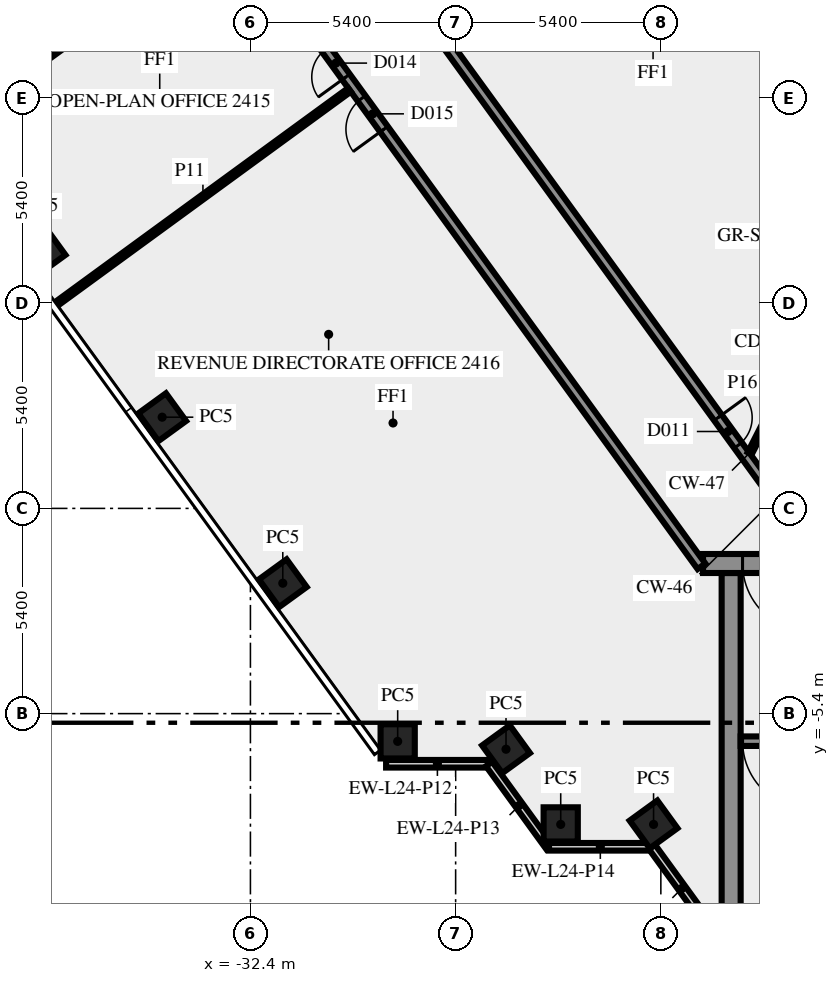
"""IFC4 building model, lengths in metres.
Left out: names, types, materials, properties, quantities, classifications, styles, units other than length and angle.
Written with IfcOpenShell. Run it as: python <this file> out.ifc"""

import sys

from ifc_helpers import new_model, si_unit, direction, frame, frame_2d, origin, origin_2d, place, context, subcontext, project, spatial, rectangle, extrude, element, fill, save


model = new_model("IFC4")
c1 = context("Model", 3, precision=1e-05, world=origin(), true_north=direction((0.0, 1.0)))
c2 = subcontext(c1, "Body", "Model", "MODEL_VIEW")
j1 = project(units=[si_unit("LENGTHUNIT", "METRE"), si_unit("PLANEANGLEUNIT", "RADIAN")], contexts=[c1])
p1 = place(None, origin())
s1 = spatial("IfcSite", under=j1, at=p1, CompositionType="ELEMENT")
p2 = place(p1, origin())
s2 = spatial("IfcBuilding", under=s1, at=p2, CompositionType="ELEMENT")
p3 = place(p2, frame((0.0, 0.0, 105.0)))
s3 = spatial("IfcBuildingStorey", under=s2, at=p3, CompositionType="ELEMENT", Elevation=105.0)
for number, where, z_axis, x_axis in (
    (1, (-37.896, 6.769, 0.0), (0.0, 0.0, 1.0), (0.588, -0.809, 0.0)),
    (2, (-34.722, 2.4, 0.0), (0.0, 0.0, 1.0), (0.588, -0.809, 0.0)),
    (3, (-31.548, -1.969, 0.0), (0.0, 0.0, 1.0), (0.588, -0.809, 0.0)),
    (4, (-28.525, -6.13, 0.0), (0.0, 0.0, 1.0), (1.0, 0.0, 0.0)),
    (5, (-25.674, -6.337, 0.0), (0.0, 0.0, 1.0), (0.588, -0.809, 0.0)),
    (6, (-24.235, -8.315, 0.0), (0.0, 0.0, 1.0), (1.0, 0.0, 0.0)),
    (7, (-21.792, -8.315, 0.0), (0.0, 0.0, 1.0), (0.588, -0.809, 0.0)),
):
    element("IfcColumn", number, at=place(p3, frame(where, z_axis=z_axis, x_axis=x_axis)), inside=s3, PredefinedType="COLUMN", context=c2, shape_type="SweptSolid", body=[
        extrude(rectangle(XDim=0.9, YDim=0.9, at=origin_2d()), origin(), (0.0, 0.0, 1.0), 3.65),
    ])
p4 = place(p3, frame((-28.83, -6.719, 0.0), z_axis=(0.0, 0.0, 1.0), x_axis=(1.0, 0.0, 0.0)))
e8 = element("IfcWall", 8, at=p4, inside=s3, PredefinedType="SOLIDWALL", context=c2, shape_type="SweptSolid", body=[
    extrude(rectangle(XDim=2.7, YDim=0.2, at=frame_2d((1.35, 0.0))), origin(), (0.0, 0.0, 1.0), 3.65),
])
p5 = place(p3, frame((-26.12, -6.724, 0.0), z_axis=(0.0, 0.0, 1.0), x_axis=(0.587720002413, -0.809064397168, 0.0)))
e9 = element("IfcWall", 9, at=p5, inside=s3, PredefinedType="SOLIDWALL", context=c2, shape_type="SweptSolid", body=[
    extrude(rectangle(XDim=2.7, YDim=0.2, at=frame_2d((1.35, 0.0))), origin(), (0.0, 0.0, 1.0), 3.65),
])
p6 = place(p3, frame((-24.543, -8.904, 0.0), z_axis=(0.0, 0.0, 1.0), x_axis=(1.0, 0.0, 0.0)))
e10 = element("IfcWall", 10, at=p6, inside=s3, PredefinedType="SOLIDWALL", context=c2, shape_type="SweptSolid", body=[
    extrude(rectangle(XDim=2.7, YDim=0.2, at=frame_2d((1.35, 0.0))), origin(), (0.0, 0.0, 1.0), 3.65),
])
p7 = place(p3, frame((-21.833, -8.909, 0.0), z_axis=(0.0, 0.0, 1.0), x_axis=(0.587766567315, -0.809030569476, 0.0)))
e11 = element("IfcWall", 11, at=p7, inside=s3, PredefinedType="SOLIDWALL", context=c2, shape_type="SweptSolid", body=[
    extrude(rectangle(XDim=2.688, YDim=0.2, at=frame_2d((1.344, 0.0))), origin(), (0.0, 0.0, 1.0), 3.65),
])
p8 = place(p3, frame((-19.75, -10.5, 0.0), z_axis=(0.0, 0.0, 1.0), x_axis=(0.0, 1.0, 0.0)))
e12 = element("IfcWall", 12, at=p8, inside=s3, PredefinedType="SHEAR", context=c2, shape_type="SweptSolid", body=[
    extrude(rectangle(XDim=8.8, YDim=0.5, at=frame_2d((4.4, 0.0))), origin(), (0.0, 0.0, 1.0), 3.65),
])
p9 = place(p3, frame((-11.45, -6.125, 0.0), z_axis=(0.0, 0.0, 1.0), x_axis=(-1.0, 0.0, 0.0)))
e13 = element("IfcWall", 13, at=p9, inside=s3, PredefinedType="SHEAR", context=c2, shape_type="SweptSolid", body=[
    extrude(rectangle(XDim=8.05, YDim=0.25, at=frame_2d((4.025, 0.0))), origin(), (0.0, 0.0, 1.0), 3.65),
])
p10 = place(p9, frame((6.2, 0.0, 0.0)))
e14 = element("IfcOpeningElement", 14, at=p10, cuts=e13, PredefinedType="OPENING", context=c2, shape_type="SweptSolid", body=[
    extrude(rectangle(XDim=1.8, YDim=2.1, at=frame_2d((0.9, 1.05))), frame((0.0, 0.135, 0.0), z_axis=(0.0, -1.0, 0.0), x_axis=(1.0, 0.0, 0.0)), (0.0, 0.0, 1.0), 0.27),
])
p11 = place(p3, frame((20.49, -1.45, 0.0), z_axis=(0.0, 0.0, 1.0), x_axis=(-1.0, 0.0, 0.0)))
e15 = element("IfcWall", 15, at=p11, inside=s3, PredefinedType="SHEAR", context=c2, shape_type="SweptSolid", body=[
    extrude(rectangle(XDim=40.98, YDim=0.5, at=frame_2d((20.49, 0.0))), origin(), (0.0, 0.0, 1.0), 3.65),
])
p12 = place(p11, frame((38.14, 0.0, 0.0)))
e16 = element("IfcOpeningElement", 16, at=p12, cuts=e15, PredefinedType="OPENING", context=c2, shape_type="SweptSolid", body=[
    extrude(rectangle(XDim=1.8, YDim=2.1, at=frame_2d((0.9, 1.05))), frame((0.0, 0.26, 0.0), z_axis=(0.0, -1.0, 0.0), x_axis=(1.0, 0.0, 0.0)), (0.0, 0.0, 1.0), 0.52),
])
p13 = place(p11, frame((36.728, 0.0, 0.0)))
e17 = element("IfcOpeningElement", 17, at=p13, cuts=e15, PredefinedType="OPENING", context=c2, shape_type="SweptSolid", body=[
    extrude(rectangle(XDim=0.8, YDim=2.1, at=frame_2d((0.4, 1.05))), frame((0.0, 0.26, 0.0), z_axis=(0.0, -1.0, 0.0), x_axis=(1.0, 0.0, 0.0)), (0.0, 0.0, 1.0), 0.52),
])
p14 = place(p11, frame((35.153, 0.0, 0.0)))
e18 = element("IfcOpeningElement", 18, at=p14, cuts=e15, PredefinedType="OPENING", context=c2, shape_type="SweptSolid", body=[
    extrude(rectangle(XDim=0.8, YDim=2.1, at=frame_2d((0.4, 1.05))), frame((0.0, 0.26, 0.0), z_axis=(0.0, -1.0, 0.0), x_axis=(1.0, 0.0, 0.0)), (0.0, 0.0, 1.0), 0.52),
])
p15 = place(p11, frame((32.94, 0.0, 0.0)))
e19 = element("IfcOpeningElement", 19, at=p15, cuts=e15, PredefinedType="OPENING", context=c2, shape_type="SweptSolid", body=[
    extrude(rectangle(XDim=0.9, YDim=2.1, at=frame_2d((0.45, 1.05))), frame((0.0, 0.26, 0.0), z_axis=(0.0, -1.0, 0.0), x_axis=(1.0, 0.0, 0.0)), (0.0, 0.0, 1.0), 0.52),
])
p16 = place(p11, frame((19.59, 0.0, 0.0)))
e20 = element("IfcOpeningElement", 20, at=p16, cuts=e15, PredefinedType="OPENING", context=c2, shape_type="SweptSolid", body=[
    extrude(rectangle(XDim=2.0, YDim=2.1, at=frame_2d((1.0, 1.05))), frame((0.0, 0.26, 0.0), z_axis=(0.0, -1.0, 0.0), x_axis=(1.0, 0.0, 0.0)), (0.0, 0.0, 1.0), 0.52),
])
p17 = place(p11, frame((7.14, 0.0, 0.0)))
e21 = element("IfcOpeningElement", 21, at=p17, cuts=e15, PredefinedType="OPENING", context=c2, shape_type="SweptSolid", body=[
    extrude(rectangle(XDim=0.9, YDim=2.1, at=frame_2d((0.45, 1.05))), frame((0.0, 0.26, 0.0), z_axis=(0.0, -1.0, 0.0), x_axis=(1.0, 0.0, 0.0)), (0.0, 0.0, 1.0), 0.52),
])
p18 = place(p11, frame((4.19, 0.0, 0.0)))
e22 = element("IfcOpeningElement", 22, at=p18, cuts=e15, PredefinedType="OPENING", context=c2, shape_type="SweptSolid", body=[
    extrude(rectangle(XDim=0.9, YDim=2.1, at=frame_2d((0.45, 1.05))), frame((0.0, 0.26, 0.0), z_axis=(0.0, -1.0, 0.0), x_axis=(1.0, 0.0, 0.0)), (0.0, 0.0, 1.0), 0.52),
])
p19 = place(p11, frame((1.04, 0.0, 0.0)))
e23 = element("IfcOpeningElement", 23, at=p19, cuts=e15, PredefinedType="OPENING", context=c2, shape_type="SweptSolid", body=[
    extrude(rectangle(XDim=1.8, YDim=2.1, at=frame_2d((0.9, 1.05))), frame((0.0, 0.26, 0.0), z_axis=(0.0, -1.0, 0.0), x_axis=(1.0, 0.0, 0.0)), (0.0, 0.0, 1.0), 0.52),
])
p20 = place(p3, frame((-20.531, -1.523, 0.0), z_axis=(0.0, 0.0, 1.0), x_axis=(-0.587784593204, 0.809017473231, 0.0)))
e24 = element("IfcWall", 24, at=p20, inside=s3, PredefinedType="SOLIDWALL", context=c2, shape_type="SweptSolid", body=[
    extrude(rectangle(XDim=44.67, YDim=0.25, at=frame_2d((22.335, 0.0))), origin(), (0.0, 0.0, 1.0), 3.65),
])
p21 = place(p20, frame((43.296, 0.0, 0.0)))
e25 = element("IfcOpeningElement", 25, at=p21, cuts=e24, PredefinedType="OPENING", context=c2, shape_type="SweptSolid", body=[
    extrude(rectangle(XDim=0.9, YDim=2.1, at=frame_2d((0.45, 1.05))), frame((0.0, 0.135, 0.0), z_axis=(0.0, -1.0, 0.0), x_axis=(1.0, 0.0, 0.0)), (0.0, 0.0, 1.0), 0.27),
])
p22 = place(p20, frame((15.916, 0.0, 0.0)))
e26 = element("IfcOpeningElement", 26, at=p22, cuts=e24, PredefinedType="OPENING", context=c2, shape_type="SweptSolid", body=[
    extrude(rectangle(XDim=0.9, YDim=2.1, at=frame_2d((0.45, 1.05))), frame((0.0, 0.135, 0.0), z_axis=(0.0, -1.0, 0.0), x_axis=(1.0, 0.0, 0.0)), (0.0, 0.0, 1.0), 0.27),
])
p23 = place(p20, frame((33.116, 0.0, 0.0)))
e27 = element("IfcOpeningElement", 27, at=p23, cuts=e24, PredefinedType="OPENING", context=c2, shape_type="SweptSolid", body=[
    extrude(rectangle(XDim=1.0, YDim=2.1, at=frame_2d((0.5, 1.05))), frame((0.0, 0.135, 0.0), z_axis=(0.0, -1.0, 0.0), x_axis=(1.0, 0.0, 0.0)), (0.0, 0.0, 1.0), 0.27),
])
p24 = place(p20, frame((14.216, 0.0, 0.0)))
e28 = element("IfcOpeningElement", 28, at=p24, cuts=e24, PredefinedType="OPENING", context=c2, shape_type="SweptSolid", body=[
    extrude(rectangle(XDim=1.0, YDim=2.1, at=frame_2d((0.5, 1.05))), frame((0.0, 0.135, 0.0), z_axis=(0.0, -1.0, 0.0), x_axis=(1.0, 0.0, 0.0)), (0.0, 0.0, 1.0), 0.27),
])
p25 = place(p3, frame((-37.232, 25.972, 0.0), z_axis=(0.0, 0.0, 1.0), x_axis=(0.587786323093, -0.809016216391, 0.0)))
e29 = element("IfcWall", 29, at=p25, inside=s3, PredefinedType="SOLIDWALL", context=c2, shape_type="SweptSolid", body=[
    extrude(rectangle(XDim=33.493, YDim=0.25, at=frame_2d((16.747, 0.0))), origin(), (0.0, 0.0, 1.0), 3.65),
])
p26 = place(p25, frame((13.185, 0.0, 0.0)))
e30 = element("IfcOpeningElement", 30, at=p26, cuts=e29, PredefinedType="OPENING", context=c2, shape_type="SweptSolid", body=[
    extrude(rectangle(XDim=1.2, YDim=2.1, at=frame_2d((0.6, 1.05))), frame((0.0, 0.135, 0.0), z_axis=(0.0, -1.0, 0.0), x_axis=(1.0, 0.0, 0.0)), (0.0, 0.0, 1.0), 0.27),
])
p27 = place(p25, frame((29.152, 0.0, 0.0)))
e31 = element("IfcOpeningElement", 31, at=p27, cuts=e29, PredefinedType="OPENING", context=c2, shape_type="SweptSolid", body=[
    extrude(rectangle(XDim=0.9, YDim=2.1, at=frame_2d((0.45, 1.05))), frame((0.0, 0.135, 0.0), z_axis=(0.0, -1.0, 0.0), x_axis=(1.0, 0.0, 0.0)), (0.0, 0.0, 1.0), 0.27),
])
p28 = place(p3, frame((-32.943, 15.349, 0.0), z_axis=(0.0, 0.0, 1.0), x_axis=(-0.80903787798, -0.587756507402, 0.0)))
e32 = element("IfcWall", 32, at=p28, inside=s3, PredefinedType="PARTITIONING", context=c2, shape_type="SweptSolid", body=[
    extrude(rectangle(XDim=9.652, YDim=0.12, at=frame_2d((4.826, 0.0))), origin(), (0.0, 0.0, 1.0), 2.75),
])
p29 = place(p3, frame((-37.506, 5.381, 0.0), z_axis=(0.0, 0.0, 1.0), x_axis=(0.807645841498, 0.589667868135, 0.0)))
e33 = element("IfcWall", 33, at=p29, inside=s3, PredefinedType="PARTITIONING", context=c2, shape_type="SweptSolid", body=[
    extrude(rectangle(XDim=9.551, YDim=0.12, at=frame_2d((4.775, 0.0))), origin(), (0.0, 0.0, 1.0), 2.75),
])
p30 = place(p3, frame((-19.261, 1.45, 0.0), z_axis=(0.0, 0.0, 1.0), x_axis=(0.453950796792, 0.891026752736, 0.0)))
e34 = element("IfcWall", 34, at=p30, inside=s3, PredefinedType="PARTITIONING", context=c2, shape_type="SweptSolid", body=[
    extrude(rectangle(XDim=2.778, YDim=0.12, at=frame_2d((1.389, 0.0))), origin(), (0.0, 0.0, 1.0), 3.65),
])
p31 = place(p10, origin())
e35 = element("IfcDoor", 35, at=p31, inside=s3, OperationType="DOUBLE_DOOR_SINGLE_SWING", PredefinedType="DOOR", context=c2, shape_type="SweptSolid", body=[
    extrude(rectangle(XDim=1.8, YDim=2.1, at=frame_2d((0.9, 1.05))), frame((0.0, 0.025, 0.0), z_axis=(0.0, -1.0, 0.0), x_axis=(1.0, 0.0, 0.0)), (0.0, 0.0, 1.0), 0.05),
])
fill(e14, e35)
p32 = place(p12, origin())
e36 = element("IfcDoor", 36, at=p32, inside=s3, OperationType="DOUBLE_DOOR_SINGLE_SWING", PredefinedType="DOOR", context=c2, shape_type="SweptSolid", body=[
    extrude(rectangle(XDim=1.8, YDim=2.1, at=frame_2d((0.9, 1.05))), frame((0.0, 0.025, 0.0), z_axis=(0.0, -1.0, 0.0), x_axis=(1.0, 0.0, 0.0)), (0.0, 0.0, 1.0), 0.05),
])
fill(e16, e36)
p33 = place(p22, origin())
e37 = element("IfcDoor", 37, at=p33, inside=s3, OperationType="SINGLE_SWING_LEFT", PredefinedType="DOOR", context=c2, shape_type="SweptSolid", body=[
    extrude(rectangle(XDim=0.9, YDim=2.1, at=frame_2d((0.45, 1.05))), frame((0.0, 0.025, 0.0), z_axis=(0.0, -1.0, 0.0), x_axis=(1.0, 0.0, 0.0)), (0.0, 0.0, 1.0), 0.05),
])
fill(e26, e37)
p34 = place(p24, origin())
e38 = element("IfcDoor", 38, at=p34, inside=s3, OperationType="SINGLE_SWING_RIGHT", PredefinedType="DOOR", context=c2, shape_type="SweptSolid", body=[
    extrude(rectangle(XDim=1.0, YDim=2.1, at=frame_2d((0.5, 1.05))), frame((0.0, 0.025, 0.0), z_axis=(0.0, -1.0, 0.0), x_axis=(1.0, 0.0, 0.0)), (0.0, 0.0, 1.0), 0.05),
])
fill(e28, e38)
p35 = place(p27, origin())
e39 = element("IfcDoor", 39, at=p35, inside=s3, OperationType="SINGLE_SWING_RIGHT", PredefinedType="DOOR", context=c2, shape_type="SweptSolid", body=[
    extrude(rectangle(XDim=0.9, YDim=2.1, at=frame_2d((0.45, 1.05))), frame((0.0, 0.025, 0.0), z_axis=(0.0, -1.0, 0.0), x_axis=(1.0, 0.0, 0.0)), (0.0, 0.0, 1.0), 0.05),
])
fill(e31, e39)
save(model, sys.argv[1])
